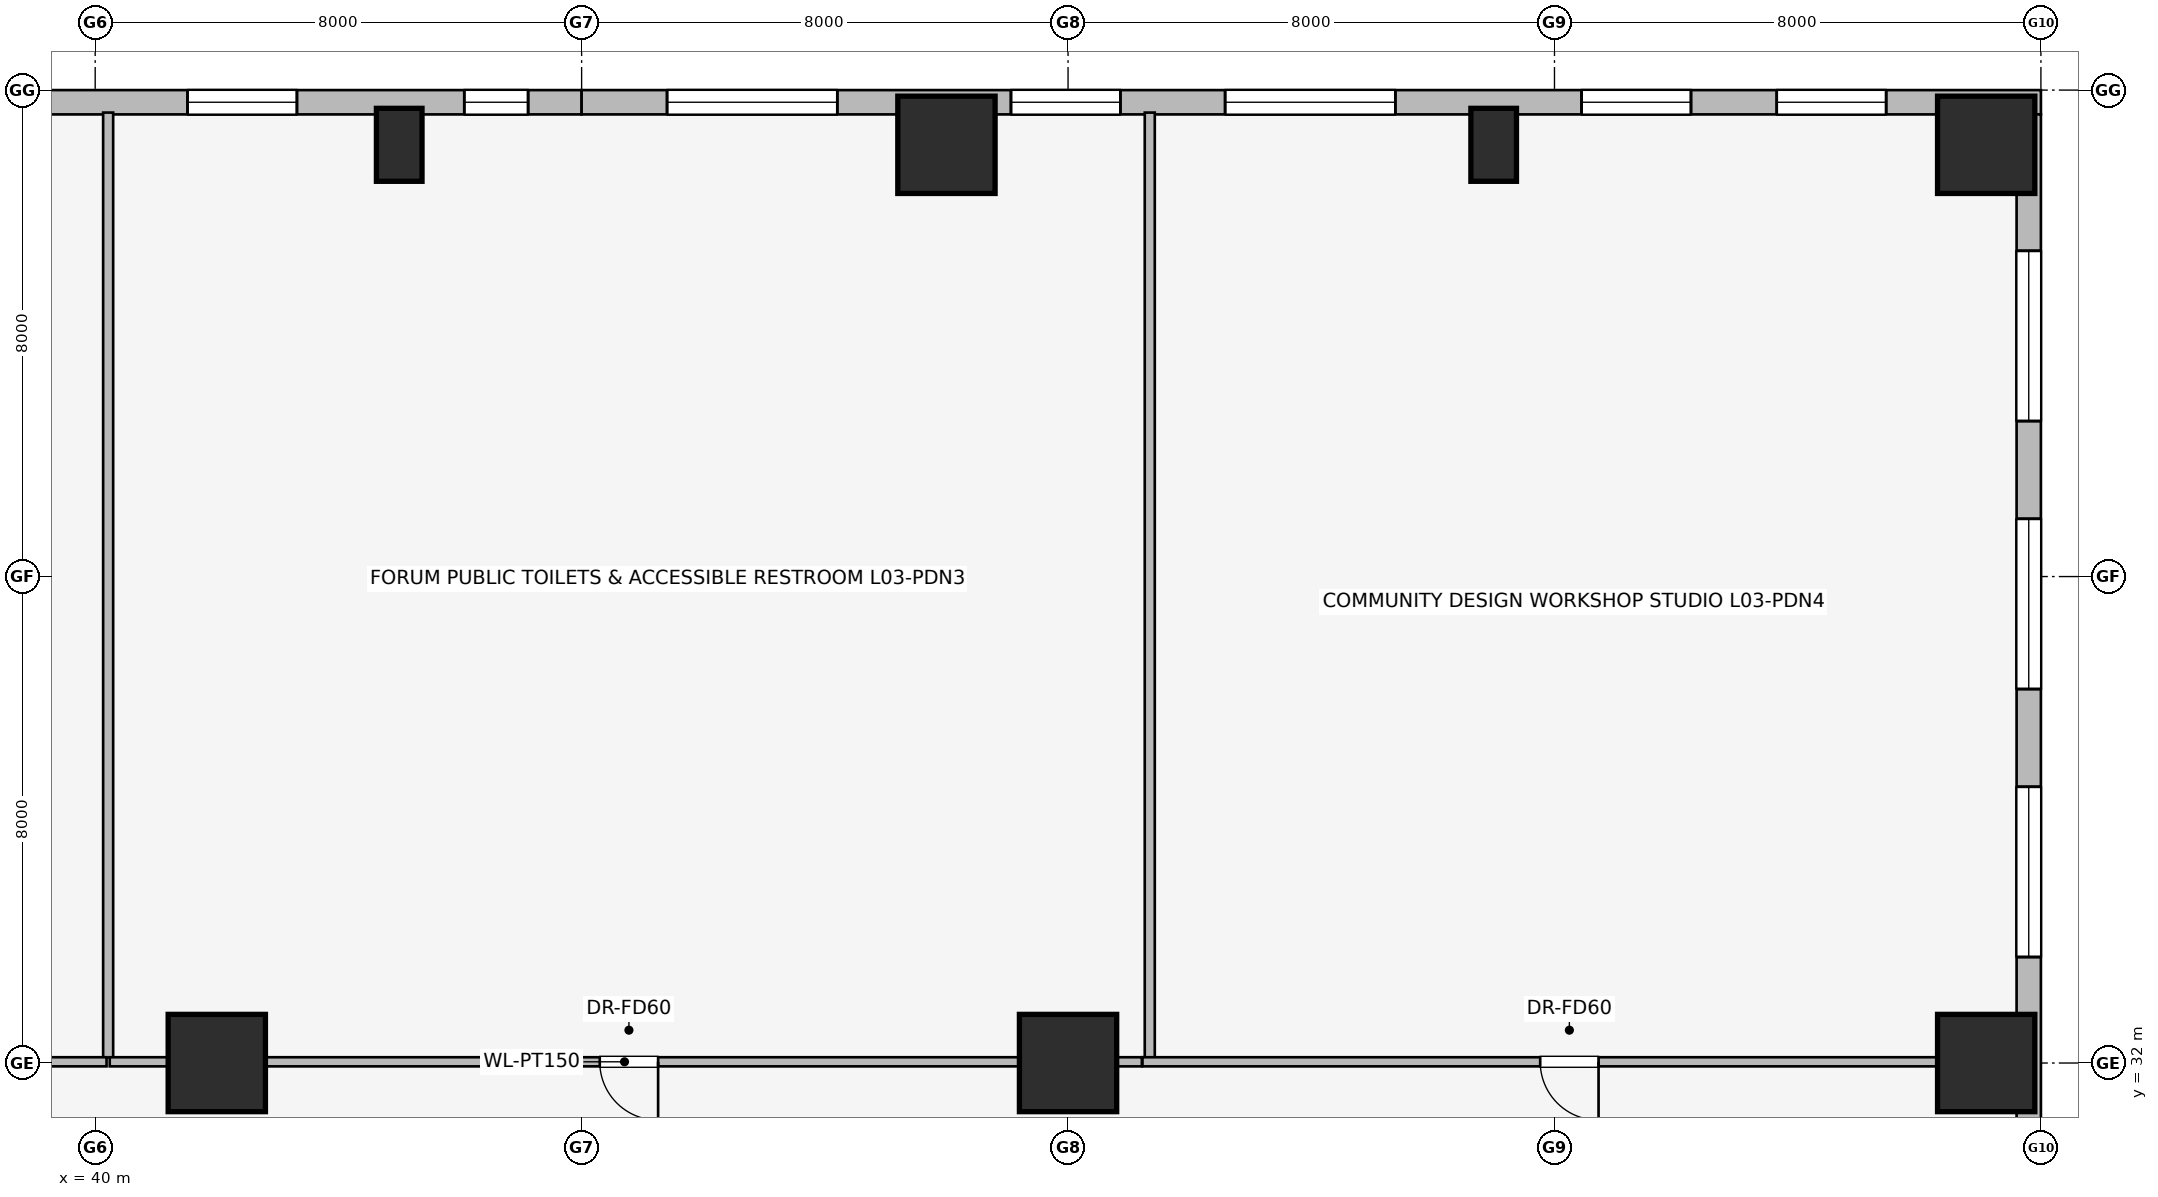
"""IFC4 building model, lengths in metres.
Left out: names, types, materials, properties, quantities, classifications, styles, units other than length and angle.
Written with IfcOpenShell. Run it as: python <this file> out.ifc"""

import sys

from ifc_helpers import new_model, si_unit, direction, frame, frame_2d, origin, origin_2d, place, context, subcontext, project, spatial, rectangle, extrude, element, fill, save


model = new_model("IFC4")
c1 = context("Model", 3, precision=1e-05, world=origin(), true_north=direction((0.0, 1.0)))
c2 = subcontext(c1, "Body", "Model", "MODEL_VIEW")
j1 = project(units=[si_unit("LENGTHUNIT", "METRE"), si_unit("PLANEANGLEUNIT", "RADIAN")], contexts=[c1])
p1 = place(None, origin())
s1 = spatial("IfcSite", under=j1, at=p1, CompositionType="ELEMENT")
p2 = place(p1, origin())
s2 = spatial("IfcBuilding", under=s1, at=p2, CompositionType="ELEMENT")
p3 = place(p2, frame((0.0, 0.0, 11.0)))
s3 = spatial("IfcBuildingStorey", under=s2, at=p3, CompositionType="ELEMENT", Elevation=11.0)
for number, where, z_axis, x_axis in (
    (1, (71.1, 47.1, 0.0), (0.0, 0.0, 1.0), (1.0, 0.0, 0.0)),
    (2, (54.0, 47.1, 0.0), (0.0, 0.0, 1.0), (1.0, 0.0, 0.0)),
    (3, (71.1, 32.0, 0.0), (0.0, 0.0, 1.0), (1.0, 0.0, 0.0)),
    (4, (42.0, 32.0, 0.0), (0.0, 0.0, 1.0), (1.0, 0.0, 0.0)),
    (5, (56.0, 32.0, 0.0), (0.0, 0.0, 1.0), (1.0, 0.0, 0.0)),
):
    element("IfcColumn", number, at=place(p3, frame(where, z_axis=z_axis, x_axis=x_axis)), inside=s3, PredefinedType="COLUMN", context=c2, shape_type="SweptSolid", body=[
        extrude(rectangle(XDim=1.6, YDim=1.6, at=origin_2d()), origin(), (0.0, 0.0, 1.0), 5.0),
    ])
for number, where, z_axis, x_axis in (
    (6, (45.0, 47.1, 0.0), (0.0, 0.0, 1.0), (1.0, 0.0, 0.0)),
    (7, (63.0, 47.1, 0.0), (0.0, 0.0, 1.0), (1.0, 0.0, 0.0)),
):
    element("IfcColumn", number, at=place(p3, frame(where, z_axis=z_axis, x_axis=x_axis)), inside=s3, PredefinedType="PILASTER", context=c2, shape_type="SweptSolid", body=[
        extrude(rectangle(XDim=0.75, YDim=1.2, at=origin_2d()), origin(), (0.0, 0.0, 1.0), 5.0),
    ])
p4 = place(p3, frame((24.0, 47.8, 0.0), z_axis=(0.0, 0.0, 1.0), x_axis=(1.0, 0.0, 0.0)))
e8 = element("IfcWall", 8, at=p4, inside=s3, PredefinedType="STANDARD", context=c2, shape_type="SweptSolid", body=[
    extrude(rectangle(XDim=24.0, YDim=0.4, at=frame_2d((12.0, 0.0))), origin(), (0.0, 0.0, 1.0), 4.69),
])
p5 = place(p4, frame((0.88, 0.0, 0.75)))
e9 = element("IfcOpeningElement", 9, at=p5, cuts=e8, PredefinedType="OPENING", context=c2, shape_type="SweptSolid", body=[
    extrude(rectangle(XDim=1.05, YDim=1.4, at=frame_2d((0.525, 0.7))), frame((0.0, 0.21, 0.0), z_axis=(0.0, -1.0, 0.0), x_axis=(1.0, 0.0, 0.0)), (0.0, 0.0, 1.0), 0.42),
])
p6 = place(p4, frame((4.06, 0.0, 0.75)))
e10 = element("IfcOpeningElement", 10, at=p6, cuts=e8, PredefinedType="OPENING", context=c2, shape_type="SweptSolid", body=[
    extrude(rectangle(XDim=1.8, YDim=1.5, at=frame_2d((0.9, 0.75))), frame((0.0, 0.21, 0.0), z_axis=(0.0, -1.0, 0.0), x_axis=(1.0, 0.0, 0.0)), (0.0, 0.0, 1.0), 0.42),
])
p7 = place(p4, frame((6.5, 0.0, 0.75)))
e11 = element("IfcOpeningElement", 11, at=p7, cuts=e8, PredefinedType="OPENING", context=c2, shape_type="SweptSolid", body=[
    extrude(rectangle(XDim=1.8, YDim=1.5, at=frame_2d((0.9, 0.75))), frame((0.0, 0.21, 0.0), z_axis=(0.0, -1.0, 0.0), x_axis=(1.0, 0.0, 0.0)), (0.0, 0.0, 1.0), 0.42),
])
p8 = place(p4, frame((8.94, 0.0, 0.75)))
e12 = element("IfcOpeningElement", 12, at=p8, cuts=e8, PredefinedType="OPENING", context=c2, shape_type="SweptSolid", body=[
    extrude(rectangle(XDim=1.8, YDim=1.5, at=frame_2d((0.9, 0.75))), frame((0.0, 0.21, 0.0), z_axis=(0.0, -1.0, 0.0), x_axis=(1.0, 0.0, 0.0)), (0.0, 0.0, 1.0), 0.42),
])
p9 = place(p4, frame((13.87, 0.0, 0.75)))
e13 = element("IfcOpeningElement", 13, at=p9, cuts=e8, PredefinedType="OPENING", context=c2, shape_type="SweptSolid", body=[
    extrude(rectangle(XDim=1.05, YDim=1.4, at=frame_2d((0.525, 0.7))), frame((0.0, 0.21, 0.0), z_axis=(0.0, -1.0, 0.0), x_axis=(1.0, 0.0, 0.0)), (0.0, 0.0, 1.0), 0.42),
])
p10 = place(p4, frame((17.518, 0.0, 0.75)))
e14 = element("IfcOpeningElement", 14, at=p10, cuts=e8, PredefinedType="OPENING", context=c2, shape_type="SweptSolid", body=[
    extrude(rectangle(XDim=1.8, YDim=1.5, at=frame_2d((0.9, 0.75))), frame((0.0, 0.21, 0.0), z_axis=(0.0, -1.0, 0.0), x_axis=(1.0, 0.0, 0.0)), (0.0, 0.0, 1.0), 0.42),
])
p11 = place(p4, frame((22.07, 0.0, 0.75)))
e15 = element("IfcOpeningElement", 15, at=p11, cuts=e8, PredefinedType="OPENING", context=c2, shape_type="SweptSolid", body=[
    extrude(rectangle(XDim=1.05, YDim=1.4, at=frame_2d((0.525, 0.7))), frame((0.0, 0.21, 0.0), z_axis=(0.0, -1.0, 0.0), x_axis=(1.0, 0.0, 0.0)), (0.0, 0.0, 1.0), 0.42),
])
p12 = place(p3, frame((48.0, 47.8, 0.0), z_axis=(0.0, 0.0, 1.0), x_axis=(1.0, 0.0, 0.0)))
e16 = element("IfcWall", 16, at=p12, inside=s3, PredefinedType="STANDARD", context=c2, shape_type="SweptSolid", body=[
    extrude(rectangle(XDim=24.0, YDim=0.4, at=frame_2d((12.0, 0.0))), origin(), (0.0, 0.0, 1.0), 4.69),
])
p13 = place(p12, frame((1.405, 0.0, 0.75)))
e17 = element("IfcOpeningElement", 17, at=p13, cuts=e16, PredefinedType="OPENING", context=c2, shape_type="SweptSolid", body=[
    extrude(rectangle(XDim=2.8, YDim=1.8, at=frame_2d((1.4, 0.9))), frame((0.0, 0.21, 0.0), z_axis=(0.0, -1.0, 0.0), x_axis=(1.0, 0.0, 0.0)), (0.0, 0.0, 1.0), 0.42),
])
p14 = place(p12, frame((7.061, 0.0, 0.75)))
e18 = element("IfcOpeningElement", 18, at=p14, cuts=e16, PredefinedType="OPENING", context=c2, shape_type="SweptSolid", body=[
    extrude(rectangle(XDim=1.8, YDim=1.5, at=frame_2d((0.9, 0.75))), frame((0.0, 0.21, 0.0), z_axis=(0.0, -1.0, 0.0), x_axis=(1.0, 0.0, 0.0)), (0.0, 0.0, 1.0), 0.42),
])
p15 = place(p12, frame((10.583, 0.0, 0.75)))
e19 = element("IfcOpeningElement", 19, at=p15, cuts=e16, PredefinedType="OPENING", context=c2, shape_type="SweptSolid", body=[
    extrude(rectangle(XDim=2.8, YDim=1.8, at=frame_2d((1.4, 0.9))), frame((0.0, 0.21, 0.0), z_axis=(0.0, -1.0, 0.0), x_axis=(1.0, 0.0, 0.0)), (0.0, 0.0, 1.0), 0.42),
])
p16 = place(p12, frame((16.445, 0.0, 0.75)))
e20 = element("IfcOpeningElement", 20, at=p16, cuts=e16, PredefinedType="OPENING", context=c2, shape_type="SweptSolid", body=[
    extrude(rectangle(XDim=1.8, YDim=1.5, at=frame_2d((0.9, 0.75))), frame((0.0, 0.21, 0.0), z_axis=(0.0, -1.0, 0.0), x_axis=(1.0, 0.0, 0.0)), (0.0, 0.0, 1.0), 0.42),
])
p17 = place(p12, frame((19.655, 0.0, 0.75)))
e21 = element("IfcOpeningElement", 21, at=p17, cuts=e16, PredefinedType="OPENING", context=c2, shape_type="SweptSolid", body=[
    extrude(rectangle(XDim=1.8, YDim=1.5, at=frame_2d((0.9, 0.75))), frame((0.0, 0.21, 0.0), z_axis=(0.0, -1.0, 0.0), x_axis=(1.0, 0.0, 0.0)), (0.0, 0.0, 1.0), 0.42),
])
p18 = place(p3, frame((71.8, 47.6, 0.0), z_axis=(0.0, 0.0, 1.0), x_axis=(0.0, -1.0, 0.0)))
e22 = element("IfcWall", 22, at=p18, inside=s3, PredefinedType="STANDARD", context=c2, shape_type="SweptSolid", body=[
    extrude(rectangle(XDim=16.6, YDim=0.4, at=frame_2d((8.3, 0.0))), origin(), (0.0, 0.0, 1.0), 4.69),
])
p19 = place(p18, frame((2.243, 0.0, 0.75)))
e23 = element("IfcOpeningElement", 23, at=p19, cuts=e22, PredefinedType="OPENING", context=c2, shape_type="SweptSolid", body=[
    extrude(rectangle(XDim=2.8, YDim=1.8, at=frame_2d((1.4, 0.9))), frame((0.0, 0.21, 0.0), z_axis=(0.0, -1.0, 0.0), x_axis=(1.0, 0.0, 0.0)), (0.0, 0.0, 1.0), 0.42),
])
p20 = place(p18, frame((6.65, 0.0, 0.75)))
e24 = element("IfcOpeningElement", 24, at=p20, cuts=e22, PredefinedType="OPENING", context=c2, shape_type="SweptSolid", body=[
    extrude(rectangle(XDim=2.8, YDim=1.8, at=frame_2d((1.4, 0.9))), frame((0.0, 0.21, 0.0), z_axis=(0.0, -1.0, 0.0), x_axis=(1.0, 0.0, 0.0)), (0.0, 0.0, 1.0), 0.42),
])
p21 = place(p18, frame((11.057, 0.0, 0.75)))
e25 = element("IfcOpeningElement", 25, at=p21, cuts=e22, PredefinedType="OPENING", context=c2, shape_type="SweptSolid", body=[
    extrude(rectangle(XDim=2.8, YDim=1.8, at=frame_2d((1.4, 0.9))), frame((0.0, 0.21, 0.0), z_axis=(0.0, -1.0, 0.0), x_axis=(1.0, 0.0, 0.0)), (0.0, 0.0, 1.0), 0.42),
])
p22 = place(p3, frame((40.213, 32.09, 0.0), z_axis=(0.0, 0.0, 1.0), x_axis=(0.0, 1.0, 0.0)))
e26 = element("IfcWall", 26, at=p22, inside=s3, PredefinedType="PARTITIONING", context=c2, shape_type="SweptSolid", body=[
    extrude(rectangle(XDim=15.54, YDim=0.165, at=frame_2d((7.77, 0.0))), origin(), (0.0, 0.0, 1.0), 4.082),
])
p23 = place(p3, frame((57.344, 32.09, 0.0), z_axis=(0.0, 0.0, 1.0), x_axis=(0.0, 1.0, 0.0)))
e27 = element("IfcWall", 27, at=p23, inside=s3, PredefinedType="PARTITIONING", context=c2, shape_type="SweptSolid", body=[
    extrude(rectangle(XDim=15.54, YDim=0.165, at=frame_2d((7.77, 0.0))), origin(), (0.0, 0.0, 1.0), 4.69),
])
p24 = place(p3, frame((40.187, 32.02, 0.0), z_axis=(0.0, 0.0, 1.0), x_axis=(-1.0, 0.0, 0.0)))
e28 = element("IfcWall", 28, at=p24, inside=s3, PredefinedType="PARTITIONING", context=c2, shape_type="SweptSolid", body=[
    extrude(rectangle(XDim=7.646, YDim=0.15, at=frame_2d((3.823, 0.0))), origin(), (0.0, 0.0, 1.0), 4.69),
])
p25 = place(p24, frame((3.343, 0.0, 0.0)))
e29 = element("IfcOpeningElement", 29, at=p25, cuts=e28, PredefinedType="OPENING", context=c2, shape_type="SweptSolid", body=[
    extrude(rectangle(XDim=0.96, YDim=2.0, at=frame_2d((0.48, 1.0))), frame((0.0, 0.085, 0.0), z_axis=(0.0, -1.0, 0.0), x_axis=(1.0, 0.0, 0.0)), (0.0, 0.0, 1.0), 0.17),
])
p26 = place(p3, frame((57.214, 32.02, 0.0), z_axis=(0.0, 0.0, 1.0), x_axis=(-1.0, 0.0, 0.0)))
e30 = element("IfcWall", 30, at=p26, inside=s3, PredefinedType="PARTITIONING", context=c2, shape_type="SweptSolid", body=[
    extrude(rectangle(XDim=16.975, YDim=0.15, at=frame_2d((8.488, 0.0))), origin(), (0.0, 0.0, 1.0), 3.742),
])
p27 = place(p26, frame((7.956, 0.0, 0.0)))
e31 = element("IfcOpeningElement", 31, at=p27, cuts=e30, PredefinedType="OPENING", context=c2, shape_type="SweptSolid", body=[
    extrude(rectangle(XDim=0.96, YDim=2.0, at=frame_2d((0.48, 1.0))), frame((0.0, 0.085, 0.0), z_axis=(0.0, -1.0, 0.0), x_axis=(1.0, 0.0, 0.0)), (0.0, 0.0, 1.0), 0.17),
])
p28 = place(p3, frame((71.605, 32.02, 0.0), z_axis=(0.0, 0.0, 1.0), x_axis=(-1.0, 0.0, 0.0)))
e32 = element("IfcWall", 32, at=p28, inside=s3, PredefinedType="PARTITIONING", context=c2, shape_type="SweptSolid", body=[
    extrude(rectangle(XDim=14.381, YDim=0.15, at=frame_2d((7.19, 0.0))), origin(), (0.0, 0.0, 1.0), 3.742),
])
p29 = place(p28, frame((6.88, 0.0, 0.0)))
e33 = element("IfcOpeningElement", 33, at=p29, cuts=e32, PredefinedType="OPENING", context=c2, shape_type="SweptSolid", body=[
    extrude(rectangle(XDim=0.96, YDim=2.0, at=frame_2d((0.48, 1.0))), frame((0.0, 0.085, 0.0), z_axis=(0.0, -1.0, 0.0), x_axis=(1.0, 0.0, 0.0)), (0.0, 0.0, 1.0), 0.17),
])
p30 = place(p10, origin())
e34 = element("IfcWindow", 34, at=p30, inside=s3, PartitioningType="SINGLE_PANEL", PredefinedType="WINDOW", context=c2, shape_type="SweptSolid", body=[
    extrude(rectangle(XDim=1.8, YDim=1.5, at=frame_2d((0.9, 0.75))), frame((0.0, 0.03, 0.0), z_axis=(0.0, -1.0, 0.0), x_axis=(1.0, 0.0, 0.0)), (0.0, 0.0, 1.0), 0.06),
])
fill(e14, e34)
p31 = place(p11, origin())
e35 = element("IfcWindow", 35, at=p31, inside=s3, PartitioningType="SINGLE_PANEL", PredefinedType="WINDOW", context=c2, shape_type="SweptSolid", body=[
    extrude(rectangle(XDim=1.05, YDim=1.4, at=frame_2d((0.525, 0.7))), frame((0.0, 0.03, 0.0), z_axis=(0.0, -1.0, 0.0), x_axis=(1.0, 0.0, 0.0)), (0.0, 0.0, 1.0), 0.06),
])
fill(e15, e35)
p32 = place(p13, origin())
e36 = element("IfcWindow", 36, at=p32, inside=s3, PartitioningType="SINGLE_PANEL", PredefinedType="WINDOW", context=c2, shape_type="SweptSolid", body=[
    extrude(rectangle(XDim=2.8, YDim=1.8, at=frame_2d((1.4, 0.9))), frame((0.0, 0.03, 0.0), z_axis=(0.0, -1.0, 0.0), x_axis=(1.0, 0.0, 0.0)), (0.0, 0.0, 1.0), 0.06),
])
fill(e17, e36)
p33 = place(p14, origin())
e37 = element("IfcWindow", 37, at=p33, inside=s3, PartitioningType="SINGLE_PANEL", PredefinedType="WINDOW", context=c2, shape_type="SweptSolid", body=[
    extrude(rectangle(XDim=1.8, YDim=1.5, at=frame_2d((0.9, 0.75))), frame((0.0, 0.03, 0.0), z_axis=(0.0, -1.0, 0.0), x_axis=(1.0, 0.0, 0.0)), (0.0, 0.0, 1.0), 0.06),
])
fill(e18, e37)
p34 = place(p15, origin())
e38 = element("IfcWindow", 38, at=p34, inside=s3, PartitioningType="SINGLE_PANEL", PredefinedType="WINDOW", context=c2, shape_type="SweptSolid", body=[
    extrude(rectangle(XDim=2.8, YDim=1.8, at=frame_2d((1.4, 0.9))), frame((0.0, 0.03, 0.0), z_axis=(0.0, -1.0, 0.0), x_axis=(1.0, 0.0, 0.0)), (0.0, 0.0, 1.0), 0.06),
])
fill(e19, e38)
p35 = place(p16, origin())
e39 = element("IfcWindow", 39, at=p35, inside=s3, PartitioningType="SINGLE_PANEL", PredefinedType="WINDOW", context=c2, shape_type="SweptSolid", body=[
    extrude(rectangle(XDim=1.8, YDim=1.5, at=frame_2d((0.9, 0.75))), frame((0.0, 0.03, 0.0), z_axis=(0.0, -1.0, 0.0), x_axis=(1.0, 0.0, 0.0)), (0.0, 0.0, 1.0), 0.06),
])
fill(e20, e39)
p36 = place(p17, origin())
e40 = element("IfcWindow", 40, at=p36, inside=s3, PartitioningType="SINGLE_PANEL", PredefinedType="WINDOW", context=c2, shape_type="SweptSolid", body=[
    extrude(rectangle(XDim=1.8, YDim=1.5, at=frame_2d((0.9, 0.75))), frame((0.0, 0.03, 0.0), z_axis=(0.0, -1.0, 0.0), x_axis=(1.0, 0.0, 0.0)), (0.0, 0.0, 1.0), 0.06),
])
fill(e21, e40)
p37 = place(p19, origin())
e41 = element("IfcWindow", 41, at=p37, inside=s3, PartitioningType="SINGLE_PANEL", PredefinedType="WINDOW", context=c2, shape_type="SweptSolid", body=[
    extrude(rectangle(XDim=2.8, YDim=1.8, at=frame_2d((1.4, 0.9))), frame((0.0, 0.03, 0.0), z_axis=(0.0, -1.0, 0.0), x_axis=(1.0, 0.0, 0.0)), (0.0, 0.0, 1.0), 0.06),
])
fill(e23, e41)
p38 = place(p20, origin())
e42 = element("IfcWindow", 42, at=p38, inside=s3, PartitioningType="SINGLE_PANEL", PredefinedType="WINDOW", context=c2, shape_type="SweptSolid", body=[
    extrude(rectangle(XDim=2.8, YDim=1.8, at=frame_2d((1.4, 0.9))), frame((0.0, 0.03, 0.0), z_axis=(0.0, -1.0, 0.0), x_axis=(1.0, 0.0, 0.0)), (0.0, 0.0, 1.0), 0.06),
])
fill(e24, e42)
p39 = place(p21, origin())
e43 = element("IfcWindow", 43, at=p39, inside=s3, PartitioningType="SINGLE_PANEL", PredefinedType="WINDOW", context=c2, shape_type="SweptSolid", body=[
    extrude(rectangle(XDim=2.8, YDim=1.8, at=frame_2d((1.4, 0.9))), frame((0.0, 0.03, 0.0), z_axis=(0.0, -1.0, 0.0), x_axis=(1.0, 0.0, 0.0)), (0.0, 0.0, 1.0), 0.06),
])
fill(e25, e43)
p40 = place(p27, origin())
e44 = element("IfcDoor", 44, at=p40, inside=s3, OperationType="SINGLE_SWING_LEFT", PredefinedType="DOOR", context=c2, shape_type="SweptSolid", body=[
    extrude(rectangle(XDim=0.96, YDim=2.0, at=frame_2d((0.48, 1.0))), frame((0.0, 0.025, 0.0), z_axis=(0.0, -1.0, 0.0), x_axis=(1.0, 0.0, 0.0)), (0.0, 0.0, 1.0), 0.05),
])
fill(e31, e44)
p41 = place(p29, origin())
e45 = element("IfcDoor", 45, at=p41, inside=s3, OperationType="SINGLE_SWING_LEFT", PredefinedType="DOOR", context=c2, shape_type="SweptSolid", body=[
    extrude(rectangle(XDim=0.96, YDim=2.0, at=frame_2d((0.48, 1.0))), frame((0.0, 0.025, 0.0), z_axis=(0.0, -1.0, 0.0), x_axis=(1.0, 0.0, 0.0)), (0.0, 0.0, 1.0), 0.05),
])
fill(e33, e45)
save(model, sys.argv[1])
